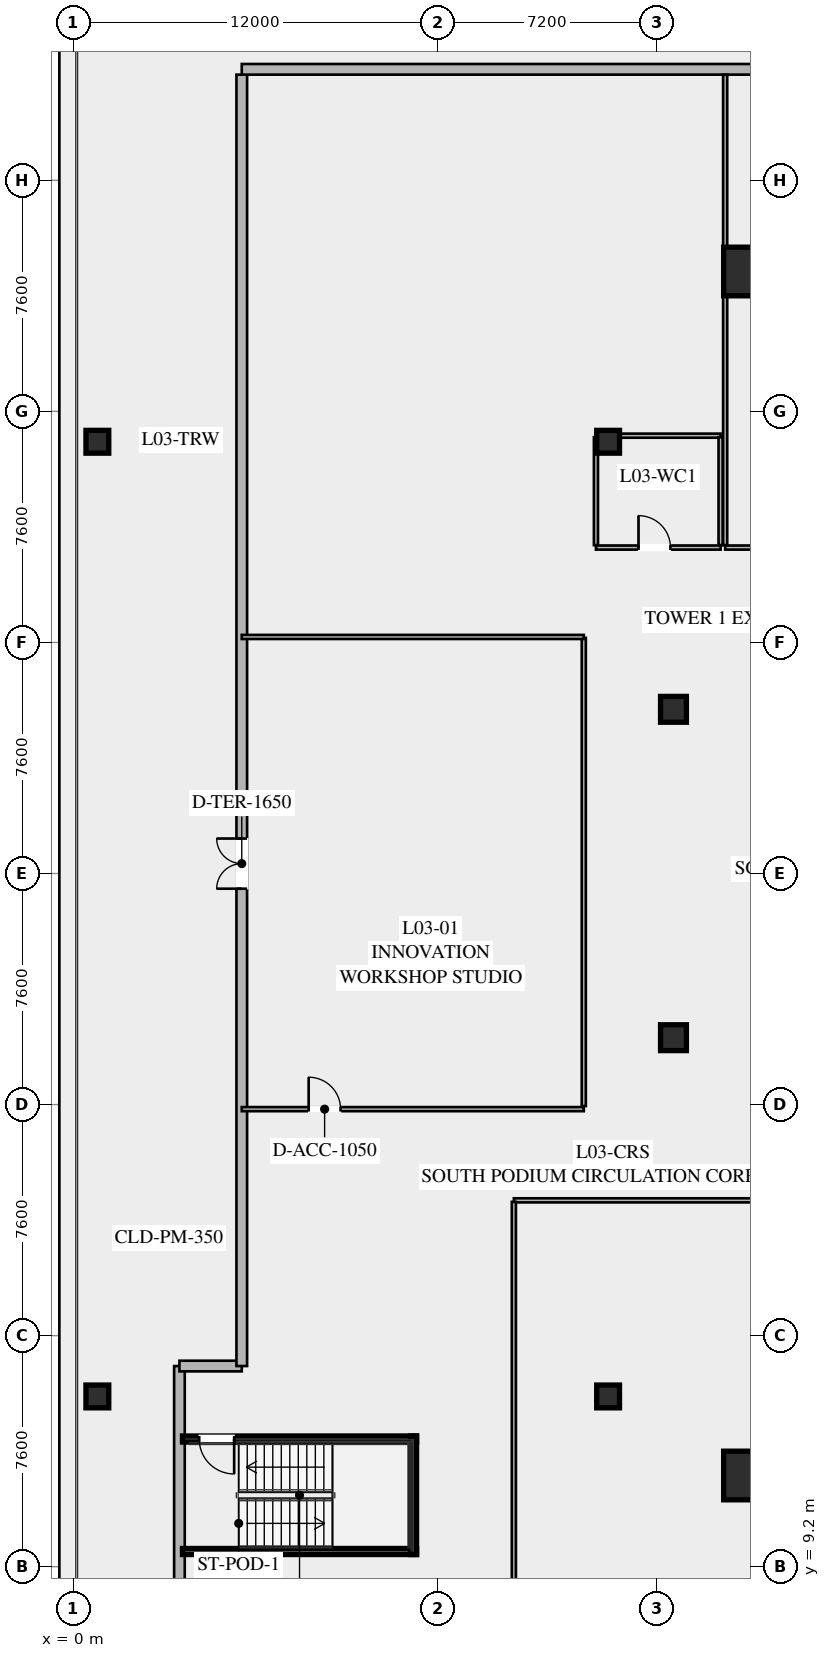
"""IFC4 building model, lengths in metres.
Left out: names, types, materials, properties, quantities, classifications, styles, units other than length and angle.
Written with IfcOpenShell. Run it as: python <this file> out.ifc"""

import sys

from ifc_helpers import new_model, si_unit, direction, frame, frame_2d, origin, origin_2d, place, context, subcontext, project, spatial, rectangle, hollow_rectangle, extrude, element, fill, save


model = new_model("IFC4")
c1 = context("Model", 3, precision=1e-05, world=origin(), true_north=direction((0.0, 1.0)))
c2 = subcontext(c1, "Body", "Model", "MODEL_VIEW")
j1 = project(units=[si_unit("LENGTHUNIT", "METRE"), si_unit("PLANEANGLEUNIT", "RADIAN")], contexts=[c1])
p1 = place(None, origin())
s1 = spatial("IfcSite", under=j1, at=p1, CompositionType="ELEMENT")
p2 = place(p1, origin())
s2 = spatial("IfcBuilding", under=s1, at=p2, CompositionType="ELEMENT")
p3 = place(p2, frame((0.0, 0.0, 15.6)))
s3 = spatial("IfcBuildingStorey", under=s2, at=p3, CompositionType="ELEMENT", Elevation=15.6)
for number, where, z_axis, x_axis in (
    (1, (22.2, 12.2, 0.0), (0.0, 0.0, 1.0), (1.0, 0.0, 0.0)),
    (2, (22.2, 51.8, 0.0), (0.0, 0.0, 1.0), (1.0, 0.0, 0.0)),
):
    element("IfcColumn", number, at=place(p3, frame(where, z_axis=z_axis, x_axis=x_axis)), inside=s3, PredefinedType="COLUMN", context=c2, shape_type="SweptSolid", body=[
        extrude(hollow_rectangle(XDim=1.6, YDim=1.6, WallThickness=0.06, at=origin_2d()), origin(), (0.0, 0.0, 1.0), 3.9),
    ])
for number, where, z_axis, x_axis in (
    (3, (19.75, 37.4, 0.0), (0.0, 0.0, 1.0), (1.0, 0.0, 0.0)),
    (4, (19.75, 26.6, 0.0), (0.0, 0.0, 1.0), (1.0, 0.0, 0.0)),
):
    element("IfcColumn", number, at=place(p3, frame(where, z_axis=z_axis, x_axis=x_axis)), inside=s3, PredefinedType="COLUMN", context=c2, shape_type="SweptSolid", body=[
        extrude(hollow_rectangle(XDim=0.85, YDim=0.85, WallThickness=0.035, at=origin_2d()), origin(), (0.0, 0.0, 1.0), 3.9),
    ])
for number, where, z_axis, x_axis in (
    (5, (0.8, 14.8, 0.0), (0.0, 0.0, 1.0), (1.0, 0.0, 0.0)),
    (6, (0.8, 46.2, 0.0), (0.0, 0.0, 1.0), (1.0, 0.0, 0.0)),
    (7, (17.6, 14.8, 0.0), (0.0, 0.0, 1.0), (1.0, 0.0, 0.0)),
    (8, (17.6, 46.2, 0.0), (0.0, 0.0, 1.0), (1.0, 0.0, 0.0)),
):
    element("IfcColumn", number, at=place(p3, frame(where, z_axis=z_axis, x_axis=x_axis)), inside=s3, PredefinedType="COLUMN", context=c2, shape_type="SweptSolid", body=[
        extrude(rectangle(XDim=0.75, YDim=0.75, at=origin_2d()), origin(), (0.0, 0.0, 1.0), 3.9),
    ])
p4 = place(p3, frame((3.5, 5.375, 0.0), z_axis=(0.0, 0.0, 1.0), x_axis=(0.0, 1.0, 0.0)))
e9 = element("IfcWall", 9, at=p4, inside=s3, PredefinedType="SOLIDWALL", context=c2, shape_type="SweptSolid", body=[
    extrude(rectangle(XDim=10.425, YDim=0.35, at=frame_2d((5.212, 0.0))), origin(), (0.0, 0.0, 1.0), 3.9),
])
p5 = place(p3, frame((3.5, 15.8, 0.0), z_axis=(0.0, 0.0, 1.0), x_axis=(1.0, 0.0, 0.0)))
e10 = element("IfcWall", 10, at=p5, inside=s3, PredefinedType="SOLIDWALL", context=c2, shape_type="SweptSolid", body=[
    extrude(rectangle(XDim=2.05, YDim=0.35, at=frame_2d((1.025, 0.0))), origin(), (0.0, 0.0, 1.0), 3.9),
])
p6 = place(p3, frame((5.55, 15.8, 0.0), z_axis=(0.0, 0.0, 1.0), x_axis=(0.0, 1.0, 0.0)))
e11 = element("IfcWall", 11, at=p6, inside=s3, PredefinedType="SOLIDWALL", context=c2, shape_type="SweptSolid", body=[
    extrude(rectangle(XDim=42.475, YDim=0.35, at=frame_2d((21.237, 0.0))), origin(), (0.0, 0.0, 1.0), 3.9),
])
p7 = place(p6, frame((15.7, 0.0, 0.0)))
e12 = element("IfcOpeningElement", 12, at=p7, cuts=e11, PredefinedType="OPENING", context=c2, shape_type="SweptSolid", body=[
    extrude(rectangle(XDim=1.65, YDim=2.2, at=frame_2d((0.825, 1.1))), frame((0.0, 0.185, 0.0), z_axis=(0.0, -1.0, 0.0), x_axis=(1.0, 0.0, 0.0)), (0.0, 0.0, 1.0), 0.37),
])
p8 = place(p3, frame((5.55, 58.45, 0.0), z_axis=(0.0, 0.0, 1.0), x_axis=(1.0, 0.0, 0.0)))
e13 = element("IfcWall", 13, at=p8, inside=s3, PredefinedType="SOLIDWALL", context=c2, shape_type="SweptSolid", body=[
    extrude(rectangle(XDim=138.275, YDim=0.35, at=frame_2d((69.137, 0.0))), origin(), (0.0, 0.0, 1.0), 3.9),
])
p9 = place(p8, frame((18.95, 0.0, 0.95)))
e14 = element("IfcOpeningElement", 14, at=p9, cuts=e13, PredefinedType="OPENING", context=c2, shape_type="SweptSolid", body=[
    extrude(rectangle(XDim=3.6, YDim=1.8, at=frame_2d((1.8, 0.9))), frame((0.0, 0.185, 0.0), z_axis=(0.0, -1.0, 0.0), x_axis=(1.0, 0.0, 0.0)), (0.0, 0.0, 1.0), 0.37),
])
p10 = place(p8, frame((64.65, 0.0, 0.95)))
e15 = element("IfcOpeningElement", 15, at=p10, cuts=e13, PredefinedType="OPENING", context=c2, shape_type="SweptSolid", body=[
    extrude(rectangle(XDim=3.6, YDim=1.8, at=frame_2d((1.8, 0.9))), frame((0.0, 0.185, 0.0), z_axis=(0.0, -1.0, 0.0), x_axis=(1.0, 0.0, 0.0)), (0.0, 0.0, 1.0), 0.37),
])
p11 = place(p8, frame((74.25, 0.0, 0.95)))
e16 = element("IfcOpeningElement", 16, at=p11, cuts=e13, PredefinedType="OPENING", context=c2, shape_type="SweptSolid", body=[
    extrude(rectangle(XDim=3.6, YDim=1.8, at=frame_2d((1.8, 0.9))), frame((0.0, 0.185, 0.0), z_axis=(0.0, -1.0, 0.0), x_axis=(1.0, 0.0, 0.0)), (0.0, 0.0, 1.0), 0.37),
])
p12 = place(p3, frame((11.3, 13.4, 0.0), z_axis=(0.0, 0.0, 1.0), x_axis=(-1.0, 0.0, 0.0)))
e17 = element("IfcWall", 17, at=p12, inside=s3, PredefinedType="SHEAR", context=c2, shape_type="SweptSolid", body=[
    extrude(rectangle(XDim=7.7, YDim=0.2, at=frame_2d((3.85, 0.0))), origin(), (0.0, 0.0, 1.0), 3.9),
])
p13 = place(p12, frame((6.0, 0.0, 0.0)))
e18 = element("IfcOpeningElement", 18, at=p13, cuts=e17, PredefinedType="OPENING", context=c2, shape_type="SweptSolid", body=[
    extrude(rectangle(XDim=1.15, YDim=2.2, at=frame_2d((0.575, 1.1))), frame((0.0, 0.11, 0.0), z_axis=(0.0, -1.0, 0.0), x_axis=(1.0, 0.0, 0.0)), (0.0, 0.0, 1.0), 0.22),
])
p14 = place(p3, frame((3.6, 9.7, 0.0), z_axis=(0.0, 0.0, 1.0), x_axis=(1.0, 0.0, 0.0)))
e19 = element("IfcWall", 19, at=p14, inside=s3, PredefinedType="SHEAR", context=c2, shape_type="SweptSolid", body=[
    extrude(rectangle(XDim=7.7, YDim=0.2, at=frame_2d((3.85, 0.0))), origin(), (0.0, 0.0, 1.0), 3.9),
])
p15 = place(p3, frame((11.2, 9.6, 0.0), z_axis=(0.0, 0.0, 1.0), x_axis=(0.0, 1.0, 0.0)))
e20 = element("IfcWall", 20, at=p15, inside=s3, PredefinedType="SHEAR", context=c2, shape_type="SweptSolid", body=[
    extrude(rectangle(XDim=3.9, YDim=0.2, at=frame_2d((1.95, 0.0))), origin(), (0.0, 0.0, 1.0), 3.9),
])
p16 = place(p3, frame((5.55, 24.25, 0.0), z_axis=(0.0, 0.0, 1.0), x_axis=(1.0, 0.0, 0.0)))
e21 = element("IfcWall", 21, at=p16, inside=s3, PredefinedType="PARTITIONING", context=c2, shape_type="SweptSolid", body=[
    extrude(rectangle(XDim=11.25, YDim=0.135, at=frame_2d((5.625, 0.0))), origin(), (0.0, 0.0, 1.0), 2.943),
])
p17 = place(p16, frame((2.2, 0.0, 0.0)))
e22 = element("IfcOpeningElement", 22, at=p17, cuts=e21, PredefinedType="OPENING", context=c2, shape_type="SweptSolid", body=[
    extrude(rectangle(XDim=1.05, YDim=2.2, at=frame_2d((0.525, 1.1))), frame((0.0, 0.077, 0.0), z_axis=(0.0, -1.0, 0.0), x_axis=(1.0, 0.0, 0.0)), (0.0, 0.0, 1.0), 0.155),
])
p18 = place(p3, frame((16.8, 24.35, 0.0), z_axis=(0.0, 0.0, 1.0), x_axis=(0.0, 1.0, 0.0)))
e23 = element("IfcWall", 23, at=p18, inside=s3, PredefinedType="PARTITIONING", context=c2, shape_type="SweptSolid", body=[
    extrude(rectangle(XDim=15.4, YDim=0.135, at=frame_2d((7.7, 0.0))), origin(), (0.0, 0.0, 1.0), 2.943),
])
p19 = place(p3, frame((5.55, 39.78, 0.0), z_axis=(0.0, 0.0, 1.0), x_axis=(1.0, 0.0, 0.0)))
e24 = element("IfcWall", 24, at=p19, inside=s3, PredefinedType="PARTITIONING", context=c2, shape_type="SweptSolid", body=[
    extrude(rectangle(XDim=11.25, YDim=0.135, at=frame_2d((5.625, 0.0))), origin(), (0.0, 0.0, 1.0), 2.943),
])
p20 = place(p3, frame((21.45, 42.72, 0.0), z_axis=(0.0, 0.0, 1.0), x_axis=(1.0, 0.0, 0.0)))
e25 = element("IfcWall", 25, at=p20, inside=s3, PredefinedType="PARTITIONING", context=c2, shape_type="SweptSolid", body=[
    extrude(rectangle(XDim=54.2, YDim=0.135, at=frame_2d((27.1, 0.0))), origin(), (0.0, 0.0, 1.0), 2.943),
])
p21 = place(p20, frame((8.0, 0.0, 0.0)))
e26 = element("IfcOpeningElement", 26, at=p21, cuts=e25, PredefinedType="OPENING", context=c2, shape_type="SweptSolid", body=[
    extrude(rectangle(XDim=1.05, YDim=2.2, at=frame_2d((0.525, 1.1))), frame((0.0, 0.077, 0.0), z_axis=(0.0, -1.0, 0.0), x_axis=(1.0, 0.0, 0.0)), (0.0, 0.0, 1.0), 0.155),
])
p22 = place(p3, frame((21.45, 42.8, 0.0), z_axis=(0.0, 0.0, 1.0), x_axis=(0.0, 1.0, 0.0)))
e27 = element("IfcWall", 27, at=p22, inside=s3, PredefinedType="PARTITIONING", context=c2, shape_type="SweptSolid", body=[
    extrude(rectangle(XDim=15.47, YDim=0.135, at=frame_2d((7.735, 0.0))), origin(), (0.0, 0.0, 1.0), 2.943),
])
p23 = place(p3, frame((14.5, 21.25, 0.0), z_axis=(0.0, 0.0, 1.0), x_axis=(1.0, 0.0, 0.0)))
e28 = element("IfcWall", 28, at=p23, inside=s3, PredefinedType="PARTITIONING", context=c2, shape_type="SweptSolid", body=[
    extrude(rectangle(XDim=49.65, YDim=0.135, at=frame_2d((24.825, 0.0))), origin(), (0.0, 0.0, 1.0), 2.943),
])
p24 = place(p23, frame((12.0, 0.0, 0.0)))
e29 = element("IfcOpeningElement", 29, at=p24, cuts=e28, PredefinedType="OPENING", context=c2, shape_type="SweptSolid", body=[
    extrude(rectangle(XDim=1.05, YDim=2.2, at=frame_2d((0.525, 1.1))), frame((0.0, 0.077, 0.0), z_axis=(0.0, -1.0, 0.0), x_axis=(1.0, 0.0, 0.0)), (0.0, 0.0, 1.0), 0.155),
])
p25 = place(p3, frame((14.5, 5.38, 0.0), z_axis=(0.0, 0.0, 1.0), x_axis=(0.0, 1.0, 0.0)))
e30 = element("IfcWall", 30, at=p25, inside=s3, PredefinedType="PARTITIONING", context=c2, shape_type="SweptSolid", body=[
    extrude(rectangle(XDim=15.82, YDim=0.135, at=frame_2d((7.91, 0.0))), origin(), (0.0, 0.0, 1.0), 2.943),
])
p26 = place(p3, frame((17.2, 42.72, 0.0), z_axis=(0.0, 0.0, 1.0), x_axis=(1.0, 0.0, 0.0)))
e31 = element("IfcWall", 31, at=p26, inside=s3, PredefinedType="PARTITIONING", context=c2, shape_type="SweptSolid", body=[
    extrude(rectangle(XDim=4.1, YDim=0.135, at=frame_2d((2.05, 0.0))), origin(), (0.0, 0.0, 1.0), 2.943),
])
p27 = place(p26, frame((1.4, 0.0, 0.0)))
e32 = element("IfcOpeningElement", 32, at=p27, cuts=e31, PredefinedType="OPENING", context=c2, shape_type="SweptSolid", body=[
    extrude(rectangle(XDim=1.05, YDim=2.2, at=frame_2d((0.525, 1.1))), frame((0.0, 0.077, 0.0), z_axis=(0.0, -1.0, 0.0), x_axis=(1.0, 0.0, 0.0)), (0.0, 0.0, 1.0), 0.155),
])
p28 = place(p3, frame((17.2, 46.4, 0.0), z_axis=(0.0, 0.0, 1.0), x_axis=(1.0, 0.0, 0.0)))
e33 = element("IfcWall", 33, at=p28, inside=s3, PredefinedType="PARTITIONING", context=c2, shape_type="SweptSolid", body=[
    extrude(rectangle(XDim=4.1, YDim=0.135, at=frame_2d((2.05, 0.0))), origin(), (0.0, 0.0, 1.0), 2.943),
])
for number, where, z_axis, x_axis in (
    (34, (17.2, 42.8, 0.0), (0.0, 0.0, 1.0), (0.0, 1.0, 0.0)),
    (35, (21.3, 42.8, 0.0), (0.0, 0.0, 1.0), (0.0, 1.0, 0.0)),
):
    element("IfcWall", number, at=place(p3, frame(where, z_axis=z_axis, x_axis=x_axis)), inside=s3, PredefinedType="PARTITIONING", context=c2, shape_type="SweptSolid", body=[
        extrude(rectangle(XDim=3.55, YDim=0.135, at=frame_2d((1.775, 0.0))), origin(), (0.0, 0.0, 1.0), 2.943),
    ])
p29 = place(p7, origin())
e36 = element("IfcDoor", 36, at=p29, inside=s3, OperationType="DOUBLE_DOOR_SINGLE_SWING", PredefinedType="DOOR", context=c2, shape_type="SweptSolid", body=[
    extrude(rectangle(XDim=1.65, YDim=2.2, at=frame_2d((0.825, 1.1))), frame((0.0, 0.025, 0.0), z_axis=(0.0, -1.0, 0.0), x_axis=(1.0, 0.0, 0.0)), (0.0, 0.0, 1.0), 0.05),
])
fill(e12, e36)
p30 = place(p13, origin())
e37 = element("IfcDoor", 37, at=p30, inside=s3, OperationType="SINGLE_SWING_LEFT", PredefinedType="DOOR", context=c2, shape_type="SweptSolid", body=[
    extrude(rectangle(XDim=1.15, YDim=2.2, at=frame_2d((0.575, 1.1))), frame((0.0, 0.025, 0.0), z_axis=(0.0, -1.0, 0.0), x_axis=(1.0, 0.0, 0.0)), (0.0, 0.0, 1.0), 0.05),
])
fill(e18, e37)
p31 = place(p17, origin())
e38 = element("IfcDoor", 38, at=p31, inside=s3, OperationType="SINGLE_SWING_LEFT", PredefinedType="DOOR", context=c2, shape_type="SweptSolid", body=[
    extrude(rectangle(XDim=1.05, YDim=2.2, at=frame_2d((0.525, 1.1))), frame((0.0, 0.025, 0.0), z_axis=(0.0, -1.0, 0.0), x_axis=(1.0, 0.0, 0.0)), (0.0, 0.0, 1.0), 0.05),
])
fill(e22, e38)
p32 = place(p27, origin())
e39 = element("IfcDoor", 39, at=p32, inside=s3, OperationType="SINGLE_SWING_LEFT", PredefinedType="DOOR", context=c2, shape_type="SweptSolid", body=[
    extrude(rectangle(XDim=1.05, YDim=2.2, at=frame_2d((0.525, 1.1))), frame((0.0, 0.025, 0.0), z_axis=(0.0, -1.0, 0.0), x_axis=(1.0, 0.0, 0.0)), (0.0, 0.0, 1.0), 0.05),
])
fill(e32, e39)
save(model, sys.argv[1])
